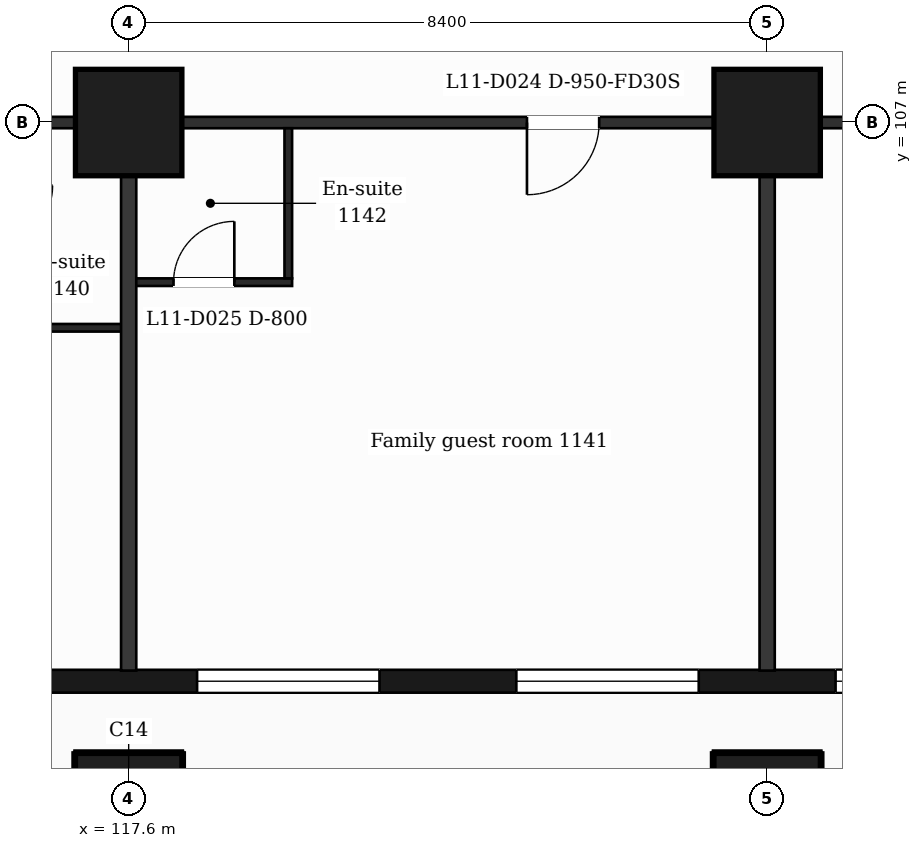
"""IFC4 building model, lengths in metres.
Left out: names, types, materials, properties, quantities, classifications, styles, units other than length and angle.
Written with IfcOpenShell. Run it as: python <this file> out.ifc"""

import sys

from ifc_helpers import new_model, si_unit, direction, frame, frame_2d, origin, origin_2d, place, context, subcontext, project, spatial, rectangle, extrude, element, fill, save


model = new_model("IFC4")
c1 = context("Model", 3, precision=1e-05, world=origin(), true_north=direction((0.0, 1.0)))
c2 = subcontext(c1, "Body", "Model", "MODEL_VIEW")
j1 = project(units=[si_unit("LENGTHUNIT", "METRE"), si_unit("PLANEANGLEUNIT", "RADIAN")], contexts=[c1])
p1 = place(None, origin())
s1 = spatial("IfcSite", under=j1, at=p1, CompositionType="ELEMENT")
p2 = place(p1, origin())
s2 = spatial("IfcBuilding", under=s1, at=p2, CompositionType="ELEMENT")
p3 = place(p2, frame((0.0, 0.0, 56.5)))
s3 = spatial("IfcBuildingStorey", under=s2, at=p3, CompositionType="ELEMENT", Elevation=56.5)
for number, where, z_axis, x_axis in (
    (1, (117.6, 98.0, 0.0), (0.0, 0.0, 1.0), (1.0, 0.0, 0.0)),
    (2, (126.0, 98.0, 0.0), (0.0, 0.0, 1.0), (1.0, 0.0, 0.0)),
    (3, (117.6, 107.0, 0.0), (0.0, 0.0, 1.0), (1.0, 0.0, 0.0)),
    (4, (126.0, 107.0, 0.0), (0.0, 0.0, 1.0), (1.0, 0.0, 0.0)),
):
    element("IfcColumn", number, at=place(p3, frame(where, z_axis=z_axis, x_axis=x_axis)), inside=s3, PredefinedType="COLUMN", context=c2, shape_type="SweptSolid", body=[
        extrude(rectangle(XDim=1.4, YDim=1.4, at=origin_2d()), origin(), (0.0, 0.0, 1.0), 3.5),
    ])
p4 = place(p3, frame((89.85, 99.65, 0.0), z_axis=(0.0, 0.0, 1.0), x_axis=(1.0, 0.0, 0.0)))
e5 = element("IfcWall", 5, at=p4, inside=s3, PredefinedType="SOLIDWALL", context=c2, shape_type="SweptSolid", body=[
    extrude(rectangle(XDim=47.25, YDim=0.3, at=frame_2d((23.625, 0.0))), origin(), (0.0, 0.0, 1.0), 3.18),
])
p5 = place(p4, frame((0.725, 0.0, 0.9)))
e6 = element("IfcOpeningElement", 6, at=p5, cuts=e5, PredefinedType="OPENING", context=c2, shape_type="SweptSolid", body=[
    extrude(rectangle(XDim=1.2, YDim=2.1, at=frame_2d((0.6, 1.05))), frame((0.0, 0.16, 0.0), z_axis=(0.0, -1.0, 0.0), x_axis=(1.0, 0.0, 0.0)), (0.0, 0.0, 1.0), 0.32),
])
p6 = place(p4, frame((3.45, 0.0, 0.9)))
e7 = element("IfcOpeningElement", 7, at=p6, cuts=e5, PredefinedType="OPENING", context=c2, shape_type="SweptSolid", body=[
    extrude(rectangle(XDim=2.4, YDim=2.1, at=frame_2d((1.2, 1.05))), frame((0.0, 0.16, 0.0), z_axis=(0.0, -1.0, 0.0), x_axis=(1.0, 0.0, 0.0)), (0.0, 0.0, 1.0), 0.32),
])
p7 = place(p4, frame((7.35, 0.0, 0.0)))
e8 = element("IfcOpeningElement", 8, at=p7, cuts=e5, PredefinedType="OPENING", context=c2, shape_type="SweptSolid", body=[
    extrude(rectangle(XDim=1.2, YDim=2.4, at=frame_2d((0.6, 1.2))), frame((0.0, 0.16, 0.0), z_axis=(0.0, -1.0, 0.0), x_axis=(1.0, 0.0, 0.0)), (0.0, 0.0, 1.0), 0.32),
])
p8 = place(p4, frame((9.15, 0.0, 0.9)))
e9 = element("IfcOpeningElement", 9, at=p8, cuts=e5, PredefinedType="OPENING", context=c2, shape_type="SweptSolid", body=[
    extrude(rectangle(XDim=1.2, YDim=2.1, at=frame_2d((0.6, 1.05))), frame((0.0, 0.16, 0.0), z_axis=(0.0, -1.0, 0.0), x_axis=(1.0, 0.0, 0.0)), (0.0, 0.0, 1.0), 0.32),
])
p9 = place(p4, frame((11.85, 0.0, 0.9)))
e10 = element("IfcOpeningElement", 10, at=p9, cuts=e5, PredefinedType="OPENING", context=c2, shape_type="SweptSolid", body=[
    extrude(rectangle(XDim=2.4, YDim=2.1, at=frame_2d((1.2, 1.05))), frame((0.0, 0.16, 0.0), z_axis=(0.0, -1.0, 0.0), x_axis=(1.0, 0.0, 0.0)), (0.0, 0.0, 1.0), 0.32),
])
p10 = place(p4, frame((16.05, 0.0, 0.9)))
e11 = element("IfcOpeningElement", 11, at=p10, cuts=e5, PredefinedType="OPENING", context=c2, shape_type="SweptSolid", body=[
    extrude(rectangle(XDim=2.4, YDim=2.1, at=frame_2d((1.2, 1.05))), frame((0.0, 0.16, 0.0), z_axis=(0.0, -1.0, 0.0), x_axis=(1.0, 0.0, 0.0)), (0.0, 0.0, 1.0), 0.32),
])
p11 = place(p4, frame((20.85, 0.0, 0.9)))
e12 = element("IfcOpeningElement", 12, at=p11, cuts=e5, PredefinedType="OPENING", context=c2, shape_type="SweptSolid", body=[
    extrude(rectangle(XDim=1.2, YDim=2.1, at=frame_2d((0.6, 1.05))), frame((0.0, 0.16, 0.0), z_axis=(0.0, -1.0, 0.0), x_axis=(1.0, 0.0, 0.0)), (0.0, 0.0, 1.0), 0.32),
])
p12 = place(p4, frame((25.05, 0.0, 0.9)))
e13 = element("IfcOpeningElement", 13, at=p12, cuts=e5, PredefinedType="OPENING", context=c2, shape_type="SweptSolid", body=[
    extrude(rectangle(XDim=1.2, YDim=2.1, at=frame_2d((0.6, 1.05))), frame((0.0, 0.16, 0.0), z_axis=(0.0, -1.0, 0.0), x_axis=(1.0, 0.0, 0.0)), (0.0, 0.0, 1.0), 0.32),
])
p13 = place(p4, frame((28.65, 0.0, 0.9)))
e14 = element("IfcOpeningElement", 14, at=p13, cuts=e5, PredefinedType="OPENING", context=c2, shape_type="SweptSolid", body=[
    extrude(rectangle(XDim=2.4, YDim=2.1, at=frame_2d((1.2, 1.05))), frame((0.0, 0.16, 0.0), z_axis=(0.0, -1.0, 0.0), x_axis=(1.0, 0.0, 0.0)), (0.0, 0.0, 1.0), 0.32),
])
p14 = place(p4, frame((32.85, 0.0, 0.9)))
e15 = element("IfcOpeningElement", 15, at=p14, cuts=e5, PredefinedType="OPENING", context=c2, shape_type="SweptSolid", body=[
    extrude(rectangle(XDim=2.4, YDim=2.1, at=frame_2d((1.2, 1.05))), frame((0.0, 0.16, 0.0), z_axis=(0.0, -1.0, 0.0), x_axis=(1.0, 0.0, 0.0)), (0.0, 0.0, 1.0), 0.32),
])
p15 = place(p4, frame((37.05, 0.0, 0.9)))
e16 = element("IfcOpeningElement", 16, at=p15, cuts=e5, PredefinedType="OPENING", context=c2, shape_type="SweptSolid", body=[
    extrude(rectangle(XDim=2.4, YDim=2.1, at=frame_2d((1.2, 1.05))), frame((0.0, 0.16, 0.0), z_axis=(0.0, -1.0, 0.0), x_axis=(1.0, 0.0, 0.0)), (0.0, 0.0, 1.0), 0.32),
])
p16 = place(p4, frame((41.25, 0.0, 0.9)))
e17 = element("IfcOpeningElement", 17, at=p16, cuts=e5, PredefinedType="OPENING", context=c2, shape_type="SweptSolid", body=[
    extrude(rectangle(XDim=2.4, YDim=2.1, at=frame_2d((1.2, 1.05))), frame((0.0, 0.16, 0.0), z_axis=(0.0, -1.0, 0.0), x_axis=(1.0, 0.0, 0.0)), (0.0, 0.0, 1.0), 0.32),
])
p17 = place(p4, frame((45.25, 0.0, 0.9)))
e18 = element("IfcOpeningElement", 18, at=p17, cuts=e5, PredefinedType="OPENING", context=c2, shape_type="SweptSolid", body=[
    extrude(rectangle(XDim=1.2, YDim=2.1, at=frame_2d((0.6, 1.05))), frame((0.0, 0.16, 0.0), z_axis=(0.0, -1.0, 0.0), x_axis=(1.0, 0.0, 0.0)), (0.0, 0.0, 1.0), 0.32),
])
p18 = place(p3, frame((115.75, 104.3, 0.0), z_axis=(0.0, 0.0, 1.0), x_axis=(1.0, 0.0, 0.0)))
e19 = element("IfcWall", 19, at=p18, inside=s3, PredefinedType="PARTITIONING", context=c2, shape_type="SweptSolid", body=[
    extrude(rectangle(XDim=1.85, YDim=0.1, at=frame_2d((0.925, 0.0))), origin(), (0.0, 0.0, 1.0), 3.18),
])
p19 = place(p3, frame((117.6, 104.9, 0.0), z_axis=(0.0, 0.0, 1.0), x_axis=(1.0, 0.0, 0.0)))
e20 = element("IfcWall", 20, at=p19, inside=s3, PredefinedType="PARTITIONING", context=c2, shape_type="SweptSolid", body=[
    extrude(rectangle(XDim=2.15, YDim=0.1, at=frame_2d((1.075, 0.0))), origin(), (0.0, 0.0, 1.0), 3.18),
])
p20 = place(p19, frame((0.59, 0.0, 0.0)))
e21 = element("IfcOpeningElement", 21, at=p20, cuts=e20, PredefinedType="OPENING", context=c2, shape_type="SweptSolid", body=[
    extrude(rectangle(XDim=0.8, YDim=2.1, at=frame_2d((0.4, 1.05))), frame((0.0, 0.06, 0.0), z_axis=(0.0, -1.0, 0.0), x_axis=(1.0, 0.0, 0.0)), (0.0, 0.0, 1.0), 0.12),
])
p21 = place(p3, frame((87.018, 107.0, 0.0), z_axis=(0.0, 0.0, 1.0), x_axis=(1.0, 0.0, 0.0)))
e22 = element("IfcWall", 22, at=p21, inside=s3, PredefinedType="PARTITIONING", context=c2, shape_type="SweptSolid", body=[
    extrude(rectangle(XDim=52.765, YDim=0.15, at=frame_2d((26.382, 0.0))), origin(), (0.0, 0.0, 1.0), 3.18),
])
p22 = place(p21, frame((1.032, 0.0, 0.0)))
e23 = element("IfcOpeningElement", 23, at=p22, cuts=e22, PredefinedType="OPENING", context=c2, shape_type="SweptSolid", body=[
    extrude(rectangle(XDim=0.95, YDim=2.1, at=frame_2d((0.475, 1.05))), frame((0.0, 0.085, 0.0), z_axis=(0.0, -1.0, 0.0), x_axis=(1.0, 0.0, 0.0)), (0.0, 0.0, 1.0), 0.17),
])
p23 = place(p21, frame((6.894, 0.0, 0.0)))
e24 = element("IfcOpeningElement", 24, at=p23, cuts=e22, PredefinedType="OPENING", context=c2, shape_type="SweptSolid", body=[
    extrude(rectangle(XDim=0.95, YDim=2.1, at=frame_2d((0.475, 1.05))), frame((0.0, 0.085, 0.0), z_axis=(0.0, -1.0, 0.0), x_axis=(1.0, 0.0, 0.0)), (0.0, 0.0, 1.0), 0.17),
])
p24 = place(p21, frame((17.844, 0.0, 0.0)))
e25 = element("IfcOpeningElement", 25, at=p24, cuts=e22, PredefinedType="OPENING", context=c2, shape_type="SweptSolid", body=[
    extrude(rectangle(XDim=0.95, YDim=2.1, at=frame_2d((0.475, 1.05))), frame((0.0, 0.085, 0.0), z_axis=(0.0, -1.0, 0.0), x_axis=(1.0, 0.0, 0.0)), (0.0, 0.0, 1.0), 0.17),
])
p25 = place(p21, frame((26.245, 0.0, 0.0)))
e26 = element("IfcOpeningElement", 26, at=p25, cuts=e22, PredefinedType="OPENING", context=c2, shape_type="SweptSolid", body=[
    extrude(rectangle(XDim=0.95, YDim=2.1, at=frame_2d((0.475, 1.05))), frame((0.0, 0.085, 0.0), z_axis=(0.0, -1.0, 0.0), x_axis=(1.0, 0.0, 0.0)), (0.0, 0.0, 1.0), 0.17),
])
p26 = place(p21, frame((35.822, 0.0, 0.0)))
e27 = element("IfcOpeningElement", 27, at=p26, cuts=e22, PredefinedType="OPENING", context=c2, shape_type="SweptSolid", body=[
    extrude(rectangle(XDim=0.95, YDim=2.1, at=frame_2d((0.475, 1.05))), frame((0.0, 0.085, 0.0), z_axis=(0.0, -1.0, 0.0), x_axis=(1.0, 0.0, 0.0)), (0.0, 0.0, 1.0), 0.17),
])
p27 = place(p21, frame((42.302, 0.0, 0.0)))
e28 = element("IfcOpeningElement", 28, at=p27, cuts=e22, PredefinedType="OPENING", context=c2, shape_type="SweptSolid", body=[
    extrude(rectangle(XDim=0.95, YDim=2.1, at=frame_2d((0.475, 1.05))), frame((0.0, 0.085, 0.0), z_axis=(0.0, -1.0, 0.0), x_axis=(1.0, 0.0, 0.0)), (0.0, 0.0, 1.0), 0.17),
])
p28 = place(p21, frame((49.285, 0.0, 0.0)))
e29 = element("IfcOpeningElement", 29, at=p28, cuts=e22, PredefinedType="OPENING", context=c2, shape_type="SweptSolid", body=[
    extrude(rectangle(XDim=0.95, YDim=2.1, at=frame_2d((0.475, 1.05))), frame((0.0, 0.085, 0.0), z_axis=(0.0, -1.0, 0.0), x_axis=(1.0, 0.0, 0.0)), (0.0, 0.0, 1.0), 0.17),
])
p29 = place(p3, frame((117.6, 99.79, 0.0), z_axis=(0.0, 0.0, 1.0), x_axis=(0.0, 1.0, 0.0)))
e30 = element("IfcWall", 30, at=p29, inside=s3, PredefinedType="PARTITIONING", context=c2, shape_type="SweptSolid", body=[
    extrude(rectangle(XDim=7.135, YDim=0.2, at=frame_2d((3.567, 0.0))), origin(), (0.0, 0.0, 1.0), 3.18),
])
p30 = place(p3, frame((119.7, 104.95, 0.0), z_axis=(0.0, 0.0, 1.0), x_axis=(0.0, 1.0, 0.0)))
e31 = element("IfcWall", 31, at=p30, inside=s3, PredefinedType="PARTITIONING", context=c2, shape_type="SweptSolid", body=[
    extrude(rectangle(XDim=1.975, YDim=0.1, at=frame_2d((0.988, 0.0))), origin(), (0.0, 0.0, 1.0), 3.18),
])
p31 = place(p3, frame((126.0, 99.79, 0.0), z_axis=(0.0, 0.0, 1.0), x_axis=(0.0, 1.0, 0.0)))
e32 = element("IfcWall", 32, at=p31, inside=s3, PredefinedType="PARTITIONING", context=c2, shape_type="SweptSolid", body=[
    extrude(rectangle(XDim=7.135, YDim=0.2, at=frame_2d((3.567, 0.0))), origin(), (0.0, 0.0, 1.0), 3.18),
])
p32 = place(p13, origin())
e33 = element("IfcWindow", 33, at=p32, inside=s3, PartitioningType="SINGLE_PANEL", PredefinedType="WINDOW", context=c2, shape_type="SweptSolid", body=[
    extrude(rectangle(XDim=2.4, YDim=2.1, at=frame_2d((1.2, 1.05))), frame((0.0, 0.03, 0.0), z_axis=(0.0, -1.0, 0.0), x_axis=(1.0, 0.0, 0.0)), (0.0, 0.0, 1.0), 0.06),
])
fill(e14, e33)
p33 = place(p14, origin())
e34 = element("IfcWindow", 34, at=p33, inside=s3, PartitioningType="SINGLE_PANEL", PredefinedType="WINDOW", context=c2, shape_type="SweptSolid", body=[
    extrude(rectangle(XDim=2.4, YDim=2.1, at=frame_2d((1.2, 1.05))), frame((0.0, 0.03, 0.0), z_axis=(0.0, -1.0, 0.0), x_axis=(1.0, 0.0, 0.0)), (0.0, 0.0, 1.0), 0.06),
])
fill(e15, e34)
p34 = place(p15, origin())
e35 = element("IfcWindow", 35, at=p34, inside=s3, PartitioningType="SINGLE_PANEL", PredefinedType="WINDOW", context=c2, shape_type="SweptSolid", body=[
    extrude(rectangle(XDim=2.4, YDim=2.1, at=frame_2d((1.2, 1.05))), frame((0.0, 0.03, 0.0), z_axis=(0.0, -1.0, 0.0), x_axis=(1.0, 0.0, 0.0)), (0.0, 0.0, 1.0), 0.06),
])
fill(e16, e35)
p35 = place(p26, origin())
e36 = element("IfcDoor", 36, at=p35, inside=s3, OperationType="SINGLE_SWING_LEFT", PredefinedType="DOOR", context=c2, shape_type="SweptSolid", body=[
    extrude(rectangle(XDim=0.95, YDim=2.1, at=frame_2d((0.475, 1.05))), frame((0.0, 0.025, 0.0), z_axis=(0.0, -1.0, 0.0), x_axis=(1.0, 0.0, 0.0)), (0.0, 0.0, 1.0), 0.05),
])
fill(e27, e36)
p36 = place(p20, origin())
e37 = element("IfcDoor", 37, at=p36, inside=s3, OperationType="SINGLE_SWING_RIGHT", PredefinedType="DOOR", context=c2, shape_type="SweptSolid", body=[
    extrude(rectangle(XDim=0.8, YDim=2.1, at=frame_2d((0.4, 1.05))), frame((0.0, 0.025, 0.0), z_axis=(0.0, -1.0, 0.0), x_axis=(1.0, 0.0, 0.0)), (0.0, 0.0, 1.0), 0.05),
])
fill(e21, e37)
save(model, sys.argv[1])
